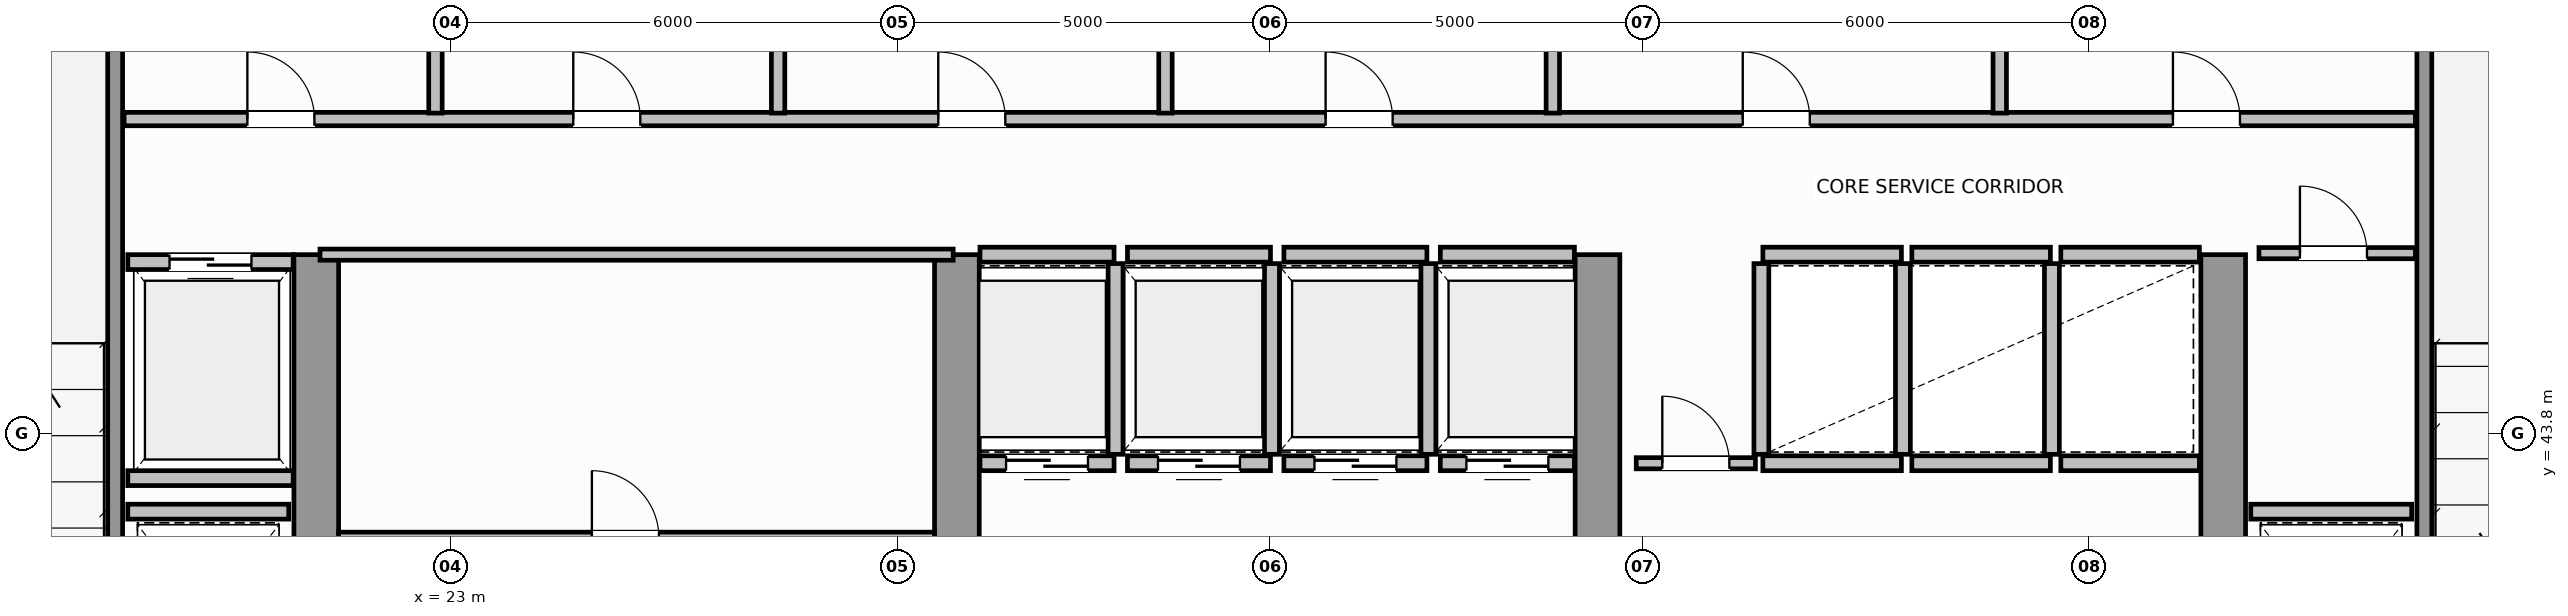
"""IFC4 building model, lengths in metres.
Left out: names, types, materials, properties, quantities, classifications, styles, units other than length and angle.
Written with IfcOpenShell. Run it as: python <this file> out.ifc"""

import sys

from ifc_helpers import new_model, si_unit, direction, frame, frame_2d, origin, place, context, subcontext, project, spatial, rectangle, extrude, source, transform, mapped, element, fill, save


model = new_model("IFC4")
c1 = context("Model", 3, precision=1e-05, world=origin(), true_north=direction((0.0, 1.0)))
c2 = subcontext(c1, "Body", "Model", "MODEL_VIEW")
j1 = project(units=[si_unit("LENGTHUNIT", "METRE"), si_unit("PLANEANGLEUNIT", "RADIAN")], contexts=[c1])
p1 = place(None, origin())
s1 = spatial("IfcSite", under=j1, at=p1, CompositionType="ELEMENT")
p2 = place(p1, origin())
s2 = spatial("IfcBuilding", under=s1, at=p2, CompositionType="ELEMENT")
p3 = place(p2, frame((0.0, 0.0, 172.8)))
s3 = spatial("IfcBuildingStorey", under=s2, at=p3, CompositionType="ELEMENT", Elevation=172.8)
for number, where, z_axis, x_axis in (
    (1, (21.2, 36.82, 0.0), (0.0, 0.0, 1.0), (0.0, 1.0, 0.0)),
    (2, (29.8, 36.82, 0.0), (0.0, 0.0, 1.0), (0.0, 1.0, 0.0)),
    (3, (38.4, 36.82, 0.0), (0.0, 0.0, 1.0), (0.0, 1.0, 0.0)),
    (4, (46.8, 36.82, 0.0), (0.0, 0.0, 1.0), (0.0, 1.0, 0.0)),
):
    element("IfcWall", number, at=place(p3, frame(where, z_axis=z_axis, x_axis=x_axis)), inside=s3, PredefinedType="SHEAR", context=c2, shape_type="SweptSolid", body=[
        extrude(rectangle(XDim=9.38, YDim=0.6, at=frame_2d((4.69, 0.0))), origin(), (0.0, 0.0, 1.0), 3.8),
    ])
for number, where, z_axis, x_axis in (
    (5, (18.5, 39.96, 0.0), (0.0, 0.0, 1.0), (0.0, 1.0, 0.0)),
    (6, (49.5, 39.96, 0.0), (0.0, 0.0, 1.0), (0.0, 1.0, 0.0)),
):
    element("IfcWall", number, at=place(p3, frame(where, z_axis=z_axis, x_axis=x_axis)), inside=s3, PredefinedType="SOLIDWALL", context=c2, shape_type="SweptSolid", body=[
        extrude(rectangle(XDim=9.93, YDim=0.2, at=frame_2d((4.965, 0.0))), origin(), (0.0, 0.0, 1.0), 3.8),
    ])
p4 = place(p3, frame((30.11, 43.4, 0.0), z_axis=(0.0, 0.0, 1.0), x_axis=(1.0, 0.0, 0.0)))
e7 = element("IfcWall", 7, at=p4, inside=s3, PredefinedType="SOLIDWALL", context=c2, shape_type="SweptSolid", body=[
    extrude(rectangle(XDim=1.8, YDim=0.2, at=frame_2d((0.9, 0.0))), origin(), (0.0, 0.0, 1.0), 3.58),
])
p5 = place(p4, frame((0.35, 0.0, 0.0)))
e8 = element("IfcOpeningElement", 8, at=p5, cuts=e7, PredefinedType="OPENING", context=c2, shape_type="SweptSolid", body=[
    extrude(rectangle(XDim=1.1, YDim=2.15, at=frame_2d((0.55, 1.075))), frame((0.0, 0.11, 0.0), z_axis=(0.0, -1.0, 0.0), x_axis=(1.0, 0.0, 0.0)), (0.0, 0.0, 1.0), 0.22),
])
p6 = place(p3, frame((30.11, 46.2, 0.0), z_axis=(0.0, 0.0, 1.0), x_axis=(1.0, 0.0, 0.0)))
e9 = element("IfcWall", 9, at=p6, inside=s3, PredefinedType="SOLIDWALL", context=c2, shape_type="SweptSolid", body=[
    extrude(rectangle(XDim=1.8, YDim=0.2, at=frame_2d((0.9, 0.0))), origin(), (0.0, 0.0, 1.0), 3.58),
])
p7 = place(p3, frame((31.93, 43.52, 0.0), z_axis=(0.0, 0.0, 1.0), x_axis=(0.0, 1.0, 0.0)))
e10 = element("IfcWall", 10, at=p7, inside=s3, PredefinedType="SOLIDWALL", context=c2, shape_type="SweptSolid", body=[
    extrude(rectangle(XDim=2.56, YDim=0.2, at=frame_2d((1.28, 0.0))), origin(), (0.0, 0.0, 1.0), 3.58),
])
p8 = place(p3, frame((32.09, 43.4, 0.0), z_axis=(0.0, 0.0, 1.0), x_axis=(1.0, 0.0, 0.0)))
e11 = element("IfcWall", 11, at=p8, inside=s3, PredefinedType="SOLIDWALL", context=c2, shape_type="SweptSolid", body=[
    extrude(rectangle(XDim=1.92, YDim=0.2, at=frame_2d((0.96, 0.0))), origin(), (0.0, 0.0, 1.0), 3.58),
])
p9 = place(p8, frame((0.41, 0.0, 0.0)))
e12 = element("IfcOpeningElement", 12, at=p9, cuts=e11, PredefinedType="OPENING", context=c2, shape_type="SweptSolid", body=[
    extrude(rectangle(XDim=1.1, YDim=2.15, at=frame_2d((0.55, 1.075))), frame((0.0, 0.11, 0.0), z_axis=(0.0, -1.0, 0.0), x_axis=(1.0, 0.0, 0.0)), (0.0, 0.0, 1.0), 0.22),
])
p10 = place(p3, frame((32.09, 46.2, 0.0), z_axis=(0.0, 0.0, 1.0), x_axis=(1.0, 0.0, 0.0)))
e13 = element("IfcWall", 13, at=p10, inside=s3, PredefinedType="SOLIDWALL", context=c2, shape_type="SweptSolid", body=[
    extrude(rectangle(XDim=1.92, YDim=0.2, at=frame_2d((0.96, 0.0))), origin(), (0.0, 0.0, 1.0), 3.58),
])
p11 = place(p3, frame((34.03, 43.52, 0.0), z_axis=(0.0, 0.0, 1.0), x_axis=(0.0, 1.0, 0.0)))
e14 = element("IfcWall", 14, at=p11, inside=s3, PredefinedType="SOLIDWALL", context=c2, shape_type="SweptSolid", body=[
    extrude(rectangle(XDim=2.56, YDim=0.2, at=frame_2d((1.28, 0.0))), origin(), (0.0, 0.0, 1.0), 3.58),
])
p12 = place(p3, frame((34.19, 43.4, 0.0), z_axis=(0.0, 0.0, 1.0), x_axis=(1.0, 0.0, 0.0)))
e15 = element("IfcWall", 15, at=p12, inside=s3, PredefinedType="SOLIDWALL", context=c2, shape_type="SweptSolid", body=[
    extrude(rectangle(XDim=1.92, YDim=0.2, at=frame_2d((0.96, 0.0))), origin(), (0.0, 0.0, 1.0), 3.58),
])
p13 = place(p12, frame((0.41, 0.0, 0.0)))
e16 = element("IfcOpeningElement", 16, at=p13, cuts=e15, PredefinedType="OPENING", context=c2, shape_type="SweptSolid", body=[
    extrude(rectangle(XDim=1.1, YDim=2.15, at=frame_2d((0.55, 1.075))), frame((0.0, 0.11, 0.0), z_axis=(0.0, -1.0, 0.0), x_axis=(1.0, 0.0, 0.0)), (0.0, 0.0, 1.0), 0.22),
])
p14 = place(p3, frame((34.19, 46.2, 0.0), z_axis=(0.0, 0.0, 1.0), x_axis=(1.0, 0.0, 0.0)))
e17 = element("IfcWall", 17, at=p14, inside=s3, PredefinedType="SOLIDWALL", context=c2, shape_type="SweptSolid", body=[
    extrude(rectangle(XDim=1.92, YDim=0.2, at=frame_2d((0.96, 0.0))), origin(), (0.0, 0.0, 1.0), 3.58),
])
p15 = place(p3, frame((36.13, 43.52, 0.0), z_axis=(0.0, 0.0, 1.0), x_axis=(0.0, 1.0, 0.0)))
e18 = element("IfcWall", 18, at=p15, inside=s3, PredefinedType="SOLIDWALL", context=c2, shape_type="SweptSolid", body=[
    extrude(rectangle(XDim=2.56, YDim=0.2, at=frame_2d((1.28, 0.0))), origin(), (0.0, 0.0, 1.0), 3.58),
])
p16 = place(p3, frame((36.29, 43.4, 0.0), z_axis=(0.0, 0.0, 1.0), x_axis=(1.0, 0.0, 0.0)))
e19 = element("IfcWall", 19, at=p16, inside=s3, PredefinedType="SOLIDWALL", context=c2, shape_type="SweptSolid", body=[
    extrude(rectangle(XDim=1.8, YDim=0.2, at=frame_2d((0.9, 0.0))), origin(), (0.0, 0.0, 1.0), 3.58),
])
p17 = place(p16, frame((0.35, 0.0, 0.0)))
e20 = element("IfcOpeningElement", 20, at=p17, cuts=e19, PredefinedType="OPENING", context=c2, shape_type="SweptSolid", body=[
    extrude(rectangle(XDim=1.1, YDim=2.15, at=frame_2d((0.55, 1.075))), frame((0.0, 0.11, 0.0), z_axis=(0.0, -1.0, 0.0), x_axis=(1.0, 0.0, 0.0)), (0.0, 0.0, 1.0), 0.22),
])
p18 = place(p3, frame((36.29, 46.2, 0.0), z_axis=(0.0, 0.0, 1.0), x_axis=(1.0, 0.0, 0.0)))
e21 = element("IfcWall", 21, at=p18, inside=s3, PredefinedType="SOLIDWALL", context=c2, shape_type="SweptSolid", body=[
    extrude(rectangle(XDim=1.8, YDim=0.2, at=frame_2d((0.9, 0.0))), origin(), (0.0, 0.0, 1.0), 3.58),
])
for number, where, z_axis, x_axis in (
    (22, (40.62, 43.4, 0.0), (0.0, 0.0, 1.0), (1.0, 0.0, 0.0)),
    (23, (40.62, 46.2, 0.0), (0.0, 0.0, 1.0), (1.0, 0.0, 0.0)),
):
    element("IfcWall", number, at=place(p3, frame(where, z_axis=z_axis, x_axis=x_axis)), inside=s3, PredefinedType="SOLIDWALL", context=c2, shape_type="SweptSolid", body=[
        extrude(rectangle(XDim=1.86, YDim=0.2, at=frame_2d((0.93, 0.0))), origin(), (0.0, 0.0, 1.0), 3.58),
    ])
for number, where, z_axis, x_axis in (
    (24, (40.6, 43.52, 0.0), (0.0, 0.0, 1.0), (0.0, 1.0, 0.0)),
    (25, (42.5, 43.52, 0.0), (0.0, 0.0, 1.0), (0.0, 1.0, 0.0)),
):
    element("IfcWall", number, at=place(p3, frame(where, z_axis=z_axis, x_axis=x_axis)), inside=s3, PredefinedType="SOLIDWALL", context=c2, shape_type="SweptSolid", body=[
        extrude(rectangle(XDim=2.56, YDim=0.2, at=frame_2d((1.28, 0.0))), origin(), (0.0, 0.0, 1.0), 3.58),
    ])
for number, where, z_axis, x_axis in (
    (26, (42.62, 43.4, 0.0), (0.0, 0.0, 1.0), (1.0, 0.0, 0.0)),
    (27, (42.62, 46.2, 0.0), (0.0, 0.0, 1.0), (1.0, 0.0, 0.0)),
):
    element("IfcWall", number, at=place(p3, frame(where, z_axis=z_axis, x_axis=x_axis)), inside=s3, PredefinedType="SOLIDWALL", context=c2, shape_type="SweptSolid", body=[
        extrude(rectangle(XDim=1.86, YDim=0.2, at=frame_2d((0.93, 0.0))), origin(), (0.0, 0.0, 1.0), 3.58),
    ])
p19 = place(p3, frame((44.5, 43.52, 0.0), z_axis=(0.0, 0.0, 1.0), x_axis=(0.0, 1.0, 0.0)))
e28 = element("IfcWall", 28, at=p19, inside=s3, PredefinedType="SOLIDWALL", context=c2, shape_type="SweptSolid", body=[
    extrude(rectangle(XDim=2.56, YDim=0.2, at=frame_2d((1.28, 0.0))), origin(), (0.0, 0.0, 1.0), 3.58),
])
for number, where, z_axis, x_axis in (
    (29, (44.62, 43.4, 0.0), (0.0, 0.0, 1.0), (1.0, 0.0, 0.0)),
    (30, (44.62, 46.2, 0.0), (0.0, 0.0, 1.0), (1.0, 0.0, 0.0)),
):
    element("IfcWall", number, at=place(p3, frame(where, z_axis=z_axis, x_axis=x_axis)), inside=s3, PredefinedType="SOLIDWALL", context=c2, shape_type="SweptSolid", body=[
        extrude(rectangle(XDim=1.86, YDim=0.2, at=frame_2d((0.93, 0.0))), origin(), (0.0, 0.0, 1.0), 3.58),
    ])
p20 = place(p3, frame((18.67, 46.1, 0.0), z_axis=(0.0, 0.0, 1.0), x_axis=(1.0, 0.0, 0.0)))
e31 = element("IfcWall", 31, at=p20, inside=s3, PredefinedType="SOLIDWALL", context=c2, shape_type="SweptSolid", body=[
    extrude(rectangle(XDim=2.22, YDim=0.2, at=frame_2d((1.11, 0.0))), origin(), (0.0, 0.0, 1.0), 3.58),
])
p21 = place(p20, frame((0.56, 0.0, 0.0)))
e32 = element("IfcOpeningElement", 32, at=p21, cuts=e31, PredefinedType="OPENING", context=c2, shape_type="SweptSolid", body=[
    extrude(rectangle(XDim=1.1, YDim=2.15, at=frame_2d((0.55, 1.075))), frame((0.0, 0.11, 0.0), z_axis=(0.0, -1.0, 0.0), x_axis=(1.0, 0.0, 0.0)), (0.0, 0.0, 1.0), 0.22),
])
p22 = place(p3, frame((18.67, 43.2, 0.0), z_axis=(0.0, 0.0, 1.0), x_axis=(1.0, 0.0, 0.0)))
e33 = element("IfcWall", 33, at=p22, inside=s3, PredefinedType="SOLIDWALL", context=c2, shape_type="SweptSolid", body=[
    extrude(rectangle(XDim=2.22, YDim=0.2, at=frame_2d((1.11, 0.0))), origin(), (0.0, 0.0, 1.0), 3.58),
])
for number, where, z_axis, x_axis in (
    (34, (18.67, 42.75, 0.0), (0.0, 0.0, 1.0), (1.0, 0.0, 0.0)),
    (35, (47.17, 42.75, 0.0), (0.0, 0.0, 1.0), (1.0, 0.0, 0.0)),
):
    element("IfcWall", number, at=place(p3, frame(where, z_axis=z_axis, x_axis=x_axis)), inside=s3, PredefinedType="SOLIDWALL", context=c2, shape_type="SweptSolid", body=[
        extrude(rectangle(XDim=2.16, YDim=0.2, at=frame_2d((1.08, 0.0))), origin(), (0.0, 0.0, 1.0), 3.58),
    ])
p23 = place(p3, frame((21.25, 46.2, 0.0), z_axis=(0.0, 0.0, 1.0), x_axis=(1.0, 0.0, 0.0)))
e36 = element("IfcWall", 36, at=p23, inside=s3, PredefinedType="PARTITIONING", context=c2, shape_type="SweptSolid", body=[
    extrude(rectangle(XDim=8.5, YDim=0.15, at=frame_2d((4.25, 0.0))), origin(), (0.0, 0.0, 1.0), 3.58),
])
p24 = place(p3, frame((21.5, 42.4, 0.0), z_axis=(0.0, 0.0, 1.0), x_axis=(1.0, 0.0, 0.0)))
e37 = element("IfcWall", 37, at=p24, inside=s3, PredefinedType="PARTITIONING", context=c2, shape_type="SweptSolid", body=[
    extrude(rectangle(XDim=8.0, YDim=0.15, at=frame_2d((4.0, 0.0))), origin(), (0.0, 0.0, 1.0), 3.58),
])
p25 = place(p24, frame((3.4, 0.0, 0.0)))
e38 = element("IfcOpeningElement", 38, at=p25, cuts=e37, PredefinedType="OPENING", context=c2, shape_type="SweptSolid", body=[
    extrude(rectangle(XDim=0.9, YDim=2.1, at=frame_2d((0.45, 1.05))), frame((0.0, 0.085, 0.0), z_axis=(0.0, -1.0, 0.0), x_axis=(1.0, 0.0, 0.0)), (0.0, 0.0, 1.0), 0.17),
])
p26 = place(p3, frame((47.28, 46.22, 0.0), z_axis=(0.0, 0.0, 1.0), x_axis=(1.0, 0.0, 0.0)))
e39 = element("IfcWall", 39, at=p26, inside=s3, PredefinedType="PARTITIONING", context=c2, shape_type="SweptSolid", body=[
    extrude(rectangle(XDim=2.1, YDim=0.15, at=frame_2d((1.05, 0.0))), origin(), (0.0, 0.0, 1.0), 3.58),
])
p27 = place(p26, frame((0.55, 0.0, 0.0)))
e40 = element("IfcOpeningElement", 40, at=p27, cuts=e39, PredefinedType="OPENING", context=c2, shape_type="SweptSolid", body=[
    extrude(rectangle(XDim=0.9, YDim=2.1, at=frame_2d((0.45, 1.05))), frame((0.0, 0.085, 0.0), z_axis=(0.0, -1.0, 0.0), x_axis=(1.0, 0.0, 0.0)), (0.0, 0.0, 1.0), 0.17),
])
p28 = place(p3, frame((38.92, 43.4, 0.0), z_axis=(0.0, 0.0, 1.0), x_axis=(1.0, 0.0, 0.0)))
e41 = element("IfcWall", 41, at=p28, inside=s3, PredefinedType="PARTITIONING", context=c2, shape_type="SweptSolid", body=[
    extrude(rectangle(XDim=1.6, YDim=0.15, at=frame_2d((0.8, 0.0))), origin(), (0.0, 0.0, 1.0), 3.58),
])
p29 = place(p28, frame((0.35, 0.0, 0.0)))
e42 = element("IfcOpeningElement", 42, at=p29, cuts=e41, PredefinedType="OPENING", context=c2, shape_type="SweptSolid", body=[
    extrude(rectangle(XDim=0.9, YDim=2.1, at=frame_2d((0.45, 1.05))), frame((0.0, 0.085, 0.0), z_axis=(0.0, -1.0, 0.0), x_axis=(1.0, 0.0, 0.0)), (0.0, 0.0, 1.0), 0.17),
])
p30 = place(p3, frame((18.62, 48.02, 0.0), z_axis=(0.0, 0.0, 1.0), x_axis=(1.0, 0.0, 0.0)))
e43 = element("IfcWall", 43, at=p30, inside=s3, PredefinedType="PLUMBINGWALL", context=c2, shape_type="SweptSolid", body=[
    extrude(rectangle(XDim=30.76, YDim=0.18, at=frame_2d((15.38, 0.0))), origin(), (0.0, 0.0, 1.0), 3.58),
])
p31 = place(p30, frame((1.655, 0.0, 0.0)))
e44 = element("IfcOpeningElement", 44, at=p31, cuts=e43, PredefinedType="OPENING", context=c2, shape_type="SweptSolid", body=[
    extrude(rectangle(XDim=0.9, YDim=2.15, at=frame_2d((0.45, 1.075))), frame((0.0, 0.1, 0.0), z_axis=(0.0, -1.0, 0.0), x_axis=(1.0, 0.0, 0.0)), (0.0, 0.0, 1.0), 0.2),
])
p32 = place(p30, frame((6.03, 0.0, 0.0)))
e45 = element("IfcOpeningElement", 45, at=p32, cuts=e43, PredefinedType="OPENING", context=c2, shape_type="SweptSolid", body=[
    extrude(rectangle(XDim=0.9, YDim=2.15, at=frame_2d((0.45, 1.075))), frame((0.0, 0.1, 0.0), z_axis=(0.0, -1.0, 0.0), x_axis=(1.0, 0.0, 0.0)), (0.0, 0.0, 1.0), 0.2),
])
p33 = place(p30, frame((10.93, 0.0, 0.0)))
e46 = element("IfcOpeningElement", 46, at=p33, cuts=e43, PredefinedType="OPENING", context=c2, shape_type="SweptSolid", body=[
    extrude(rectangle(XDim=0.9, YDim=2.15, at=frame_2d((0.45, 1.075))), frame((0.0, 0.1, 0.0), z_axis=(0.0, -1.0, 0.0), x_axis=(1.0, 0.0, 0.0)), (0.0, 0.0, 1.0), 0.2),
])
p34 = place(p30, frame((16.13, 0.0, 0.0)))
e47 = element("IfcOpeningElement", 47, at=p34, cuts=e43, PredefinedType="OPENING", context=c2, shape_type="SweptSolid", body=[
    extrude(rectangle(XDim=0.9, YDim=2.15, at=frame_2d((0.45, 1.075))), frame((0.0, 0.1, 0.0), z_axis=(0.0, -1.0, 0.0), x_axis=(1.0, 0.0, 0.0)), (0.0, 0.0, 1.0), 0.2),
])
p35 = place(p30, frame((21.73, 0.0, 0.0)))
e48 = element("IfcOpeningElement", 48, at=p35, cuts=e43, PredefinedType="OPENING", context=c2, shape_type="SweptSolid", body=[
    extrude(rectangle(XDim=0.9, YDim=2.15, at=frame_2d((0.45, 1.075))), frame((0.0, 0.1, 0.0), z_axis=(0.0, -1.0, 0.0), x_axis=(1.0, 0.0, 0.0)), (0.0, 0.0, 1.0), 0.2),
])
p36 = place(p30, frame((27.505, 0.0, 0.0)))
e49 = element("IfcOpeningElement", 49, at=p36, cuts=e43, PredefinedType="OPENING", context=c2, shape_type="SweptSolid", body=[
    extrude(rectangle(XDim=0.9, YDim=2.15, at=frame_2d((0.45, 1.075))), frame((0.0, 0.1, 0.0), z_axis=(0.0, -1.0, 0.0), x_axis=(1.0, 0.0, 0.0)), (0.0, 0.0, 1.0), 0.2),
])
p37 = place(p3, frame((22.8, 48.1, 0.0), z_axis=(0.0, 0.0, 1.0), x_axis=(0.0, 1.0, 0.0)))
e50 = element("IfcWall", 50, at=p37, inside=s3, PredefinedType="PLUMBINGWALL", context=c2, shape_type="SweptSolid", body=[
    extrude(rectangle(XDim=2.28, YDim=0.18, at=frame_2d((1.14, 0.0))), origin(), (0.0, 0.0, 1.0), 2.97),
])
for number, where, z_axis, x_axis in (
    (51, (27.4, 48.1, 0.0), (0.0, 0.0, 1.0), (0.0, 1.0, 0.0)),
    (52, (32.6, 48.1, 0.0), (0.0, 0.0, 1.0), (0.0, 1.0, 0.0)),
    (53, (37.8, 48.1, 0.0), (0.0, 0.0, 1.0), (0.0, 1.0, 0.0)),
    (54, (43.8, 48.1, 0.0), (0.0, 0.0, 1.0), (0.0, 1.0, 0.0)),
):
    element("IfcWall", number, at=place(p3, frame(where, z_axis=z_axis, x_axis=x_axis)), inside=s3, PredefinedType="PLUMBINGWALL", context=c2, shape_type="SweptSolid", body=[
        extrude(rectangle(XDim=2.28, YDim=0.18, at=frame_2d((1.14, 0.0))), origin(), (0.0, 0.0, 1.0), 3.58),
    ])
m1 = source(origin(), c2, "Body", "SweptSolid", [
    extrude(rectangle(XDim=1.1, YDim=2.15, at=frame_2d((0.55, 1.075))), frame((0.0, 0.025, 0.0), z_axis=(0.0, -1.0, 0.0), x_axis=(1.0, 0.0, 0.0)), (0.0, 0.0, 1.0), 0.05),
])
p38 = place(p5, origin())
e55 = element("IfcDoor", 55, at=p38, inside=s3, OperationType="DOUBLE_DOOR_SLIDING", PredefinedType="DOOR", context=c2, shape_type="MappedRepresentation", body=[
    mapped(m1, transform((0.0, 0.0, 0.0), scale=1.0)),
])
fill(e8, e55)
p39 = place(p9, origin())
e56 = element("IfcDoor", 56, at=p39, inside=s3, OperationType="DOUBLE_DOOR_SLIDING", PredefinedType="DOOR", context=c2, shape_type="MappedRepresentation", body=[
    mapped(m1, transform((0.0, 0.0, 0.0), scale=1.0)),
])
fill(e12, e56)
p40 = place(p13, origin())
e57 = element("IfcDoor", 57, at=p40, inside=s3, OperationType="DOUBLE_DOOR_SLIDING", PredefinedType="DOOR", context=c2, shape_type="MappedRepresentation", body=[
    mapped(m1, transform((0.0, 0.0, 0.0), scale=1.0)),
])
fill(e16, e57)
p41 = place(p17, origin())
e58 = element("IfcDoor", 58, at=p41, inside=s3, OperationType="DOUBLE_DOOR_SLIDING", PredefinedType="DOOR", context=c2, shape_type="MappedRepresentation", body=[
    mapped(m1, transform((0.0, 0.0, 0.0), scale=1.0)),
])
fill(e20, e58)
p42 = place(p21, origin())
e59 = element("IfcDoor", 59, at=p42, inside=s3, OperationType="DOUBLE_DOOR_SLIDING", PredefinedType="DOOR", context=c2, shape_type="MappedRepresentation", body=[
    mapped(m1, transform((0.0, 0.0, 0.0), scale=1.0)),
])
fill(e32, e59)
m2 = source(origin(), c2, "Body", "SweptSolid", [
    extrude(rectangle(XDim=0.9, YDim=2.1, at=frame_2d((0.45, 1.05))), frame((0.0, 0.025, 0.0), z_axis=(0.0, -1.0, 0.0), x_axis=(1.0, 0.0, 0.0)), (0.0, 0.0, 1.0), 0.05),
])
p43 = place(p25, origin())
e60 = element("IfcDoor", 60, at=p43, inside=s3, OperationType="SINGLE_SWING_RIGHT", PredefinedType="DOOR", context=c2, shape_type="MappedRepresentation", body=[
    mapped(m2, transform((0.0, 0.0, 0.0), scale=1.0)),
])
fill(e38, e60)
p44 = place(p27, origin())
e61 = element("IfcDoor", 61, at=p44, inside=s3, OperationType="SINGLE_SWING_RIGHT", PredefinedType="DOOR", context=c2, shape_type="MappedRepresentation", body=[
    mapped(m2, transform((0.0, 0.0, 0.0), scale=1.0)),
])
fill(e40, e61)
p45 = place(p29, origin())
e62 = element("IfcDoor", 62, at=p45, inside=s3, OperationType="SINGLE_SWING_LEFT", PredefinedType="DOOR", context=c2, shape_type="MappedRepresentation", body=[
    mapped(m2, transform((0.0, 0.0, 0.0), scale=1.0)),
])
fill(e42, e62)
m3 = source(origin(), c2, "Body", "SweptSolid", [
    extrude(rectangle(XDim=0.9, YDim=2.15, at=frame_2d((0.45, 1.075))), frame((0.0, 0.025, 0.0), z_axis=(0.0, -1.0, 0.0), x_axis=(1.0, 0.0, 0.0)), (0.0, 0.0, 1.0), 0.05),
])
p46 = place(p31, origin())
e63 = element("IfcDoor", 63, at=p46, inside=s3, OperationType="SINGLE_SWING_LEFT", PredefinedType="DOOR", context=c2, shape_type="MappedRepresentation", body=[
    mapped(m3, transform((0.0, 0.0, 0.0), scale=1.0)),
])
fill(e44, e63)
p47 = place(p32, origin())
e64 = element("IfcDoor", 64, at=p47, inside=s3, OperationType="SINGLE_SWING_RIGHT", PredefinedType="DOOR", context=c2, shape_type="MappedRepresentation", body=[
    mapped(m3, transform((0.0, 0.0, 0.0), scale=1.0)),
])
fill(e45, e64)
p48 = place(p33, origin())
e65 = element("IfcDoor", 65, at=p48, inside=s3, OperationType="SINGLE_SWING_LEFT", PredefinedType="DOOR", context=c2, shape_type="MappedRepresentation", body=[
    mapped(m3, transform((0.0, 0.0, 0.0), scale=1.0)),
])
fill(e46, e65)
p49 = place(p34, origin())
e66 = element("IfcDoor", 66, at=p49, inside=s3, OperationType="SINGLE_SWING_RIGHT", PredefinedType="DOOR", context=c2, shape_type="MappedRepresentation", body=[
    mapped(m3, transform((0.0, 0.0, 0.0), scale=1.0)),
])
fill(e47, e66)
p50 = place(p35, origin())
e67 = element("IfcDoor", 67, at=p50, inside=s3, OperationType="SINGLE_SWING_LEFT", PredefinedType="DOOR", context=c2, shape_type="MappedRepresentation", body=[
    mapped(m3, transform((0.0, 0.0, 0.0), scale=1.0)),
])
fill(e48, e67)
p51 = place(p36, origin())
e68 = element("IfcDoor", 68, at=p51, inside=s3, OperationType="SINGLE_SWING_RIGHT", PredefinedType="DOOR", context=c2, shape_type="MappedRepresentation", body=[
    mapped(m3, transform((0.0, 0.0, 0.0), scale=1.0)),
])
fill(e49, e68)
save(model, sys.argv[1])
